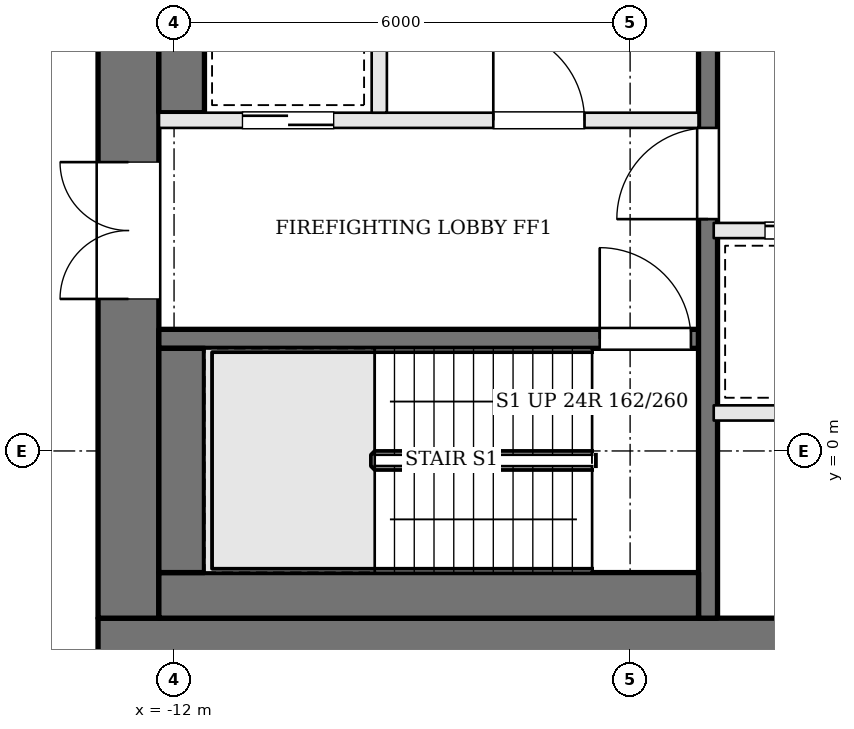
"""IFC4 building model, lengths in metres.
Left out: names, types, materials, properties, quantities, classifications, styles, units other than length and angle.
Written with IfcOpenShell. Run it as: python <this file> out.ifc"""

import sys

from ifc_helpers import new_model, si_unit, direction, frame, frame_2d, origin, place, context, subcontext, project, spatial, rectangle, extrude, element, fill, save


model = new_model("IFC4")
c1 = context("Model", 3, precision=1e-05, world=origin(), true_north=direction((0.0, 1.0)))
c2 = subcontext(c1, "Body", "Model", "MODEL_VIEW")
j1 = project(units=[si_unit("LENGTHUNIT", "METRE"), si_unit("PLANEANGLEUNIT", "RADIAN")], contexts=[c1])
p1 = place(None, origin())
s1 = spatial("IfcSite", under=j1, at=p1, CompositionType="ELEMENT")
p2 = place(p1, origin())
s2 = spatial("IfcBuilding", under=s1, at=p2, CompositionType="ELEMENT")
p3 = place(p2, frame((0.0, 0.0, 174.0)))
s3 = spatial("IfcBuildingStorey", under=s2, at=p3, CompositionType="ELEMENT", Elevation=174.0)
p4 = place(p3, frame((-13.0, -2.6, 0.0), z_axis=(0.0, 0.0, 1.0), x_axis=(1.0, 0.0, 0.0)))
e1 = element("IfcWall", 1, at=p4, inside=s3, PredefinedType="SHEAR", context=c2, shape_type="SweptSolid", body=[
    extrude(rectangle(XDim=26.0, YDim=0.8, at=frame_2d((13.0, 0.0))), origin(), (0.0, 0.0, 1.0), 3.9),
])
p5 = place(p4, frame((8.925, 0.0, 0.0)))
e2 = element("IfcOpeningElement", 2, at=p5, cuts=e1, PredefinedType="OPENING", context=c2, shape_type="SweptSolid", body=[
    extrude(rectangle(XDim=0.9, YDim=2.1, at=frame_2d((0.45, 1.05))), frame((0.0, 0.41, 0.0), z_axis=(0.0, -1.0, 0.0), x_axis=(1.0, 0.0, 0.0)), (0.0, 0.0, 1.0), 0.82),
])
p6 = place(p4, frame((11.475, 0.0, 0.0)))
e3 = element("IfcOpeningElement", 3, at=p6, cuts=e1, PredefinedType="OPENING", context=c2, shape_type="SweptSolid", body=[
    extrude(rectangle(XDim=0.9, YDim=2.1, at=frame_2d((0.45, 1.05))), frame((0.0, 0.41, 0.0), z_axis=(0.0, -1.0, 0.0), x_axis=(1.0, 0.0, 0.0)), (0.0, 0.0, 1.0), 0.82),
])
p7 = place(p4, frame((13.6, 0.0, 0.0)))
e4 = element("IfcOpeningElement", 4, at=p7, cuts=e1, PredefinedType="OPENING", context=c2, shape_type="SweptSolid", body=[
    extrude(rectangle(XDim=1.0, YDim=2.1, at=frame_2d((0.5, 1.05))), frame((0.0, 0.41, 0.0), z_axis=(0.0, -1.0, 0.0), x_axis=(1.0, 0.0, 0.0)), (0.0, 0.0, 1.0), 0.82),
])
p8 = place(p4, frame((15.95, 0.0, 0.0)))
e5 = element("IfcOpeningElement", 5, at=p8, cuts=e1, PredefinedType="OPENING", context=c2, shape_type="SweptSolid", body=[
    extrude(rectangle(XDim=1.0, YDim=2.1, at=frame_2d((0.5, 1.05))), frame((0.0, 0.41, 0.0), z_axis=(0.0, -1.0, 0.0), x_axis=(1.0, 0.0, 0.0)), (0.0, 0.0, 1.0), 0.82),
])
p9 = place(p3, frame((-12.6, -2.2, 0.0), z_axis=(0.0, 0.0, 1.0), x_axis=(0.0, 1.0, 0.0)))
e6 = element("IfcWall", 6, at=p9, inside=s3, PredefinedType="SHEAR", context=c2, shape_type="SweptSolid", body=[
    extrude(rectangle(XDim=13.4, YDim=0.8, at=frame_2d((6.7, 0.0))), origin(), (0.0, 0.0, 1.0), 3.9),
])
p10 = place(p9, frame((4.2, 0.0, 0.0)))
e7 = element("IfcOpeningElement", 7, at=p10, cuts=e6, PredefinedType="OPENING", context=c2, shape_type="SweptSolid", body=[
    extrude(rectangle(XDim=1.8, YDim=2.1, at=frame_2d((0.9, 1.05))), frame((0.0, 0.41, 0.0), z_axis=(0.0, -1.0, 0.0), x_axis=(1.0, 0.0, 0.0)), (0.0, 0.0, 1.0), 0.82),
])
p11 = place(p3, frame((-12.2, 1.475, 0.0), z_axis=(0.0, 0.0, 1.0), x_axis=(1.0, 0.0, 0.0)))
e8 = element("IfcWall", 8, at=p11, inside=s3, PredefinedType="SOLIDWALL", context=c2, shape_type="SweptSolid", body=[
    extrude(rectangle(XDim=7.1, YDim=0.25, at=frame_2d((3.55, 0.0))), origin(), (0.0, 0.0, 1.0), 3.7),
])
p12 = place(p11, frame((5.8, 0.0, 0.0)))
e9 = element("IfcOpeningElement", 9, at=p12, cuts=e8, PredefinedType="OPENING", context=c2, shape_type="SweptSolid", body=[
    extrude(rectangle(XDim=1.2, YDim=2.1, at=frame_2d((0.6, 1.05))), frame((0.0, 0.135, 0.0), z_axis=(0.0, -1.0, 0.0), x_axis=(1.0, 0.0, 0.0)), (0.0, 0.0, 1.0), 0.27),
])
p13 = place(p3, frame((-12.2, 4.35, 0.0), z_axis=(0.0, 0.0, 1.0), x_axis=(1.0, 0.0, 0.0)))
e10 = element("IfcWall", 10, at=p13, inside=s3, PredefinedType="SOLIDWALL", context=c2, shape_type="SweptSolid", body=[
    extrude(rectangle(XDim=7.1, YDim=0.2, at=frame_2d((3.55, 0.0))), origin(), (0.0, 0.0, 1.0), 3.7),
])
p14 = place(p13, frame((4.4, 0.0, 0.0)))
e11 = element("IfcOpeningElement", 11, at=p14, cuts=e10, PredefinedType="OPENING", context=c2, shape_type="SweptSolid", body=[
    extrude(rectangle(XDim=1.2, YDim=2.1, at=frame_2d((0.6, 1.05))), frame((0.0, 0.11, 0.0), z_axis=(0.0, -1.0, 0.0), x_axis=(1.0, 0.0, 0.0)), (0.0, 0.0, 1.0), 0.22),
])
p15 = place(p13, frame((1.1, 0.0, 0.0)))
e12 = element("IfcOpeningElement", 12, at=p15, cuts=e10, PredefinedType="OPENING", context=c2, shape_type="SweptSolid", body=[
    extrude(rectangle(XDim=1.2, YDim=2.1, at=frame_2d((0.6, 1.05))), frame((0.0, 0.11, 0.0), z_axis=(0.0, -1.0, 0.0), x_axis=(1.0, 0.0, 0.0)), (0.0, 0.0, 1.0), 0.22),
])
p16 = place(p3, frame((-9.3, 4.45, 0.0), z_axis=(0.0, 0.0, 1.0), x_axis=(0.0, 1.0, 0.0)))
e13 = element("IfcWall", 13, at=p16, inside=s3, PredefinedType="SOLIDWALL", context=c2, shape_type="SweptSolid", body=[
    extrude(rectangle(XDim=3.0, YDim=0.2, at=frame_2d((1.5, 0.0))), origin(), (0.0, 0.0, 1.0), 3.7),
])
p17 = place(p3, frame((-4.975, -2.2, 0.0), z_axis=(0.0, 0.0, 1.0), x_axis=(0.0, 1.0, 0.0)))
e14 = element("IfcWall", 14, at=p17, inside=s3, PredefinedType="SOLIDWALL", context=c2, shape_type="SweptSolid", body=[
    extrude(rectangle(XDim=13.4, YDim=0.25, at=frame_2d((6.7, 0.0))), origin(), (0.0, 0.0, 1.0), 3.7),
])
p18 = place(p17, frame((5.25, 0.0, 0.0)))
e15 = element("IfcOpeningElement", 15, at=p18, cuts=e14, PredefinedType="OPENING", context=c2, shape_type="SweptSolid", body=[
    extrude(rectangle(XDim=1.2, YDim=2.1, at=frame_2d((0.6, 1.05))), frame((0.0, 0.135, 0.0), z_axis=(0.0, -1.0, 0.0), x_axis=(1.0, 0.0, 0.0)), (0.0, 0.0, 1.0), 0.27),
])
p19 = place(p3, frame((-12.2, -1.9, 0.0), z_axis=(0.0, 0.0, 1.0), x_axis=(1.0, 0.0, 0.0)))
e16 = element("IfcWall", 16, at=p19, inside=s3, PredefinedType="SOLIDWALL", context=c2, shape_type="SweptSolid", body=[
    extrude(rectangle(XDim=7.1, YDim=0.6, at=frame_2d((3.55, 0.0))), origin(), (0.0, 0.0, 1.0), 3.7),
])
p20 = place(p3, frame((-11.9, -1.6, 0.0), z_axis=(0.0, 0.0, 1.0), x_axis=(0.0, 1.0, 0.0)))
e17 = element("IfcWall", 17, at=p20, inside=s3, PredefinedType="SOLIDWALL", context=c2, shape_type="SweptSolid", body=[
    extrude(rectangle(XDim=2.95, YDim=0.6, at=frame_2d((1.475, 0.0))), origin(), (0.0, 0.0, 1.0), 3.7),
])
p21 = place(p3, frame((-11.9, 4.45, 0.0), z_axis=(0.0, 0.0, 1.0), x_axis=(0.0, 1.0, 0.0)))
e18 = element("IfcWall", 18, at=p21, inside=s3, PredefinedType="SOLIDWALL", context=c2, shape_type="SweptSolid", body=[
    extrude(rectangle(XDim=3.0, YDim=0.6, at=frame_2d((1.5, 0.0))), origin(), (0.0, 0.0, 1.0), 3.7),
])
p22 = place(p3, frame((-4.9, 0.5, 0.0), z_axis=(0.0, 0.0, 1.0), x_axis=(1.0, 0.0, 0.0)))
e19 = element("IfcWall", 19, at=p22, inside=s3, PredefinedType="SOLIDWALL", context=c2, shape_type="SweptSolid", body=[
    extrude(rectangle(XDim=9.8, YDim=0.2, at=frame_2d((4.9, 0.0))), origin(), (0.0, 0.0, 1.0), 3.7),
])
p23 = place(p3, frame((-4.9, 2.9, 0.0), z_axis=(0.0, 0.0, 1.0), x_axis=(1.0, 0.0, 0.0)))
e20 = element("IfcWall", 20, at=p23, inside=s3, PredefinedType="SOLIDWALL", context=c2, shape_type="SweptSolid", body=[
    extrude(rectangle(XDim=9.8, YDim=0.2, at=frame_2d((4.9, 0.0))), origin(), (0.0, 0.0, 1.0), 3.7),
])
p24 = place(p23, frame((0.675, 0.0, 0.0)))
e21 = element("IfcOpeningElement", 21, at=p24, cuts=e20, PredefinedType="OPENING", context=c2, shape_type="SweptSolid", body=[
    extrude(rectangle(XDim=1.1, YDim=2.1, at=frame_2d((0.55, 1.05))), frame((0.0, 0.11, 0.0), z_axis=(0.0, -1.0, 0.0), x_axis=(1.0, 0.0, 0.0)), (0.0, 0.0, 1.0), 0.22),
])
p25 = place(p23, frame((2.613, 0.0, 0.0)))
e22 = element("IfcOpeningElement", 22, at=p25, cuts=e20, PredefinedType="OPENING", context=c2, shape_type="SweptSolid", body=[
    extrude(rectangle(XDim=0.9, YDim=2.1, at=frame_2d((0.45, 1.05))), frame((0.0, 0.11, 0.0), z_axis=(0.0, -1.0, 0.0), x_axis=(1.0, 0.0, 0.0)), (0.0, 0.0, 1.0), 0.22),
])
p26 = place(p23, frame((4.35, 0.0, 0.0)))
e23 = element("IfcOpeningElement", 23, at=p26, cuts=e20, PredefinedType="OPENING", context=c2, shape_type="SweptSolid", body=[
    extrude(rectangle(XDim=1.1, YDim=2.1, at=frame_2d((0.55, 1.05))), frame((0.0, 0.11, 0.0), z_axis=(0.0, -1.0, 0.0), x_axis=(1.0, 0.0, 0.0)), (0.0, 0.0, 1.0), 0.22),
])
p27 = place(p23, frame((7.463, 0.0, 0.0)))
e24 = element("IfcOpeningElement", 24, at=p27, cuts=e20, PredefinedType="OPENING", context=c2, shape_type="SweptSolid", body=[
    extrude(rectangle(XDim=1.0, YDim=2.1, at=frame_2d((0.5, 1.05))), frame((0.0, 0.11, 0.0), z_axis=(0.0, -1.0, 0.0), x_axis=(1.0, 0.0, 0.0)), (0.0, 0.0, 1.0), 0.22),
])
p28 = place(p10, origin())
e25 = element("IfcDoor", 25, at=p28, inside=s3, OperationType="DOUBLE_DOOR_SINGLE_SWING", PredefinedType="DOOR", context=c2, shape_type="SweptSolid", body=[
    extrude(rectangle(XDim=1.8, YDim=2.1, at=frame_2d((0.9, 1.05))), frame((0.0, 0.025, 0.0), z_axis=(0.0, -1.0, 0.0), x_axis=(1.0, 0.0, 0.0)), (0.0, 0.0, 1.0), 0.05),
])
fill(e7, e25)
p29 = place(p18, origin())
e26 = element("IfcDoor", 26, at=p29, inside=s3, OperationType="SINGLE_SWING_LEFT", PredefinedType="DOOR", context=c2, shape_type="SweptSolid", body=[
    extrude(rectangle(XDim=1.2, YDim=2.1, at=frame_2d((0.6, 1.05))), frame((0.0, 0.025, 0.0), z_axis=(0.0, -1.0, 0.0), x_axis=(1.0, 0.0, 0.0)), (0.0, 0.0, 1.0), 0.05),
])
fill(e15, e26)
p30 = place(p14, origin())
e27 = element("IfcDoor", 27, at=p30, inside=s3, OperationType="SINGLE_SWING_LEFT", PredefinedType="DOOR", context=c2, shape_type="SweptSolid", body=[
    extrude(rectangle(XDim=1.2, YDim=2.1, at=frame_2d((0.6, 1.05))), frame((0.0, 0.025, 0.0), z_axis=(0.0, -1.0, 0.0), x_axis=(1.0, 0.0, 0.0)), (0.0, 0.0, 1.0), 0.05),
])
fill(e11, e27)
p31 = place(p12, origin())
e28 = element("IfcDoor", 28, at=p31, inside=s3, OperationType="SINGLE_SWING_LEFT", PredefinedType="DOOR", context=c2, shape_type="SweptSolid", body=[
    extrude(rectangle(XDim=1.2, YDim=2.1, at=frame_2d((0.6, 1.05))), frame((0.0, 0.025, 0.0), z_axis=(0.0, -1.0, 0.0), x_axis=(1.0, 0.0, 0.0)), (0.0, 0.0, 1.0), 0.05),
])
fill(e9, e28)
p32 = place(p15, origin())
e29 = element("IfcDoor", 29, at=p32, inside=s3, OperationType="SLIDING_TO_RIGHT", PredefinedType="DOOR", context=c2, shape_type="SweptSolid", body=[
    extrude(rectangle(XDim=1.2, YDim=2.1, at=frame_2d((0.6, 1.05))), frame((0.0, 0.025, 0.0), z_axis=(0.0, -1.0, 0.0), x_axis=(1.0, 0.0, 0.0)), (0.0, 0.0, 1.0), 0.05),
])
fill(e12, e29)
p33 = place(p24, origin())
e30 = element("IfcDoor", 30, at=p33, inside=s3, OperationType="SLIDING_TO_RIGHT", PredefinedType="DOOR", context=c2, shape_type="SweptSolid", body=[
    extrude(rectangle(XDim=1.1, YDim=2.1, at=frame_2d((0.55, 1.05))), frame((0.0, 0.025, 0.0), z_axis=(0.0, -1.0, 0.0), x_axis=(1.0, 0.0, 0.0)), (0.0, 0.0, 1.0), 0.05),
])
fill(e21, e30)
save(model, sys.argv[1])
